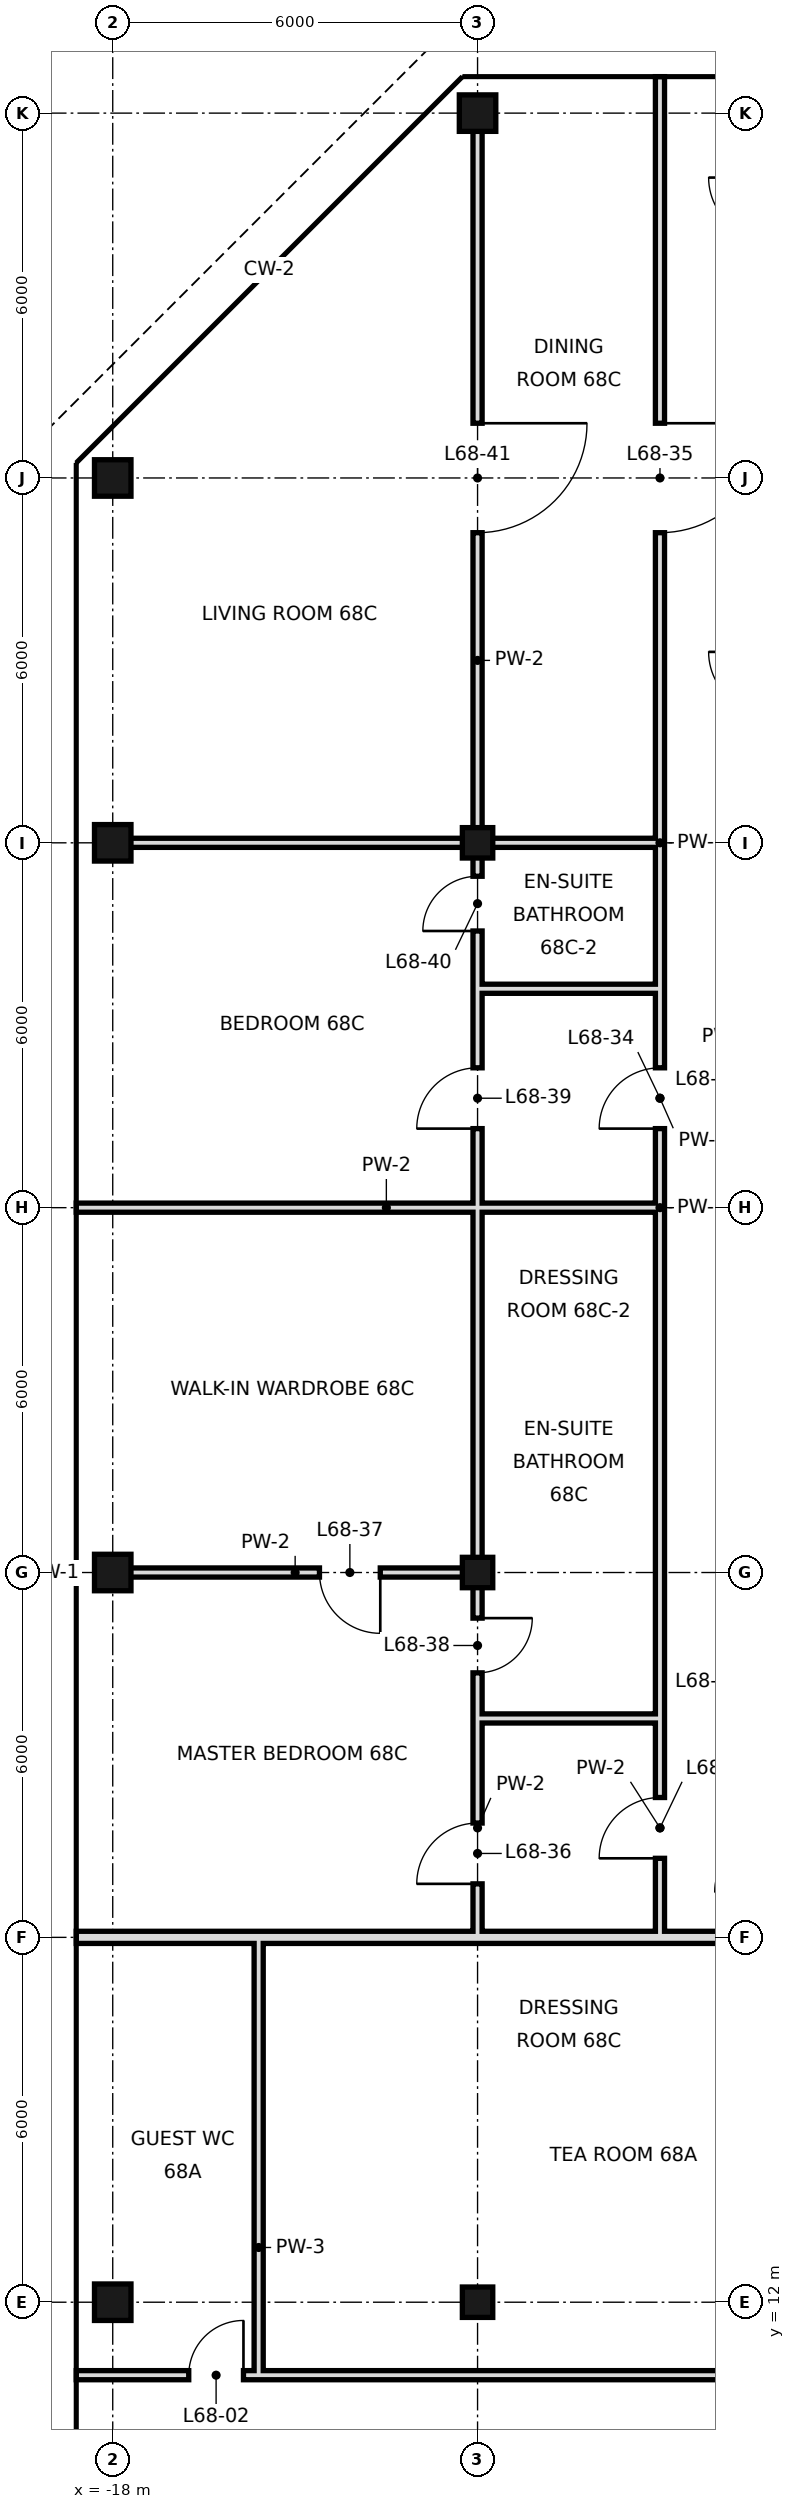
"""IFC4 building model, lengths in metres.
Left out: names, types, materials, properties, quantities, classifications, styles, units other than length and angle.
Written with IfcOpenShell. Run it as: python <this file> out.ifc"""

import sys

from ifc_helpers import new_model, si_unit, direction, frame, frame_2d, origin, origin_2d, place, context, subcontext, project, spatial, rectangle, hollow_rectangle, extrude, element, fill, save


model = new_model("IFC4")
c1 = context("Model", 3, precision=1e-05, world=origin(), true_north=direction((0.0, 1.0)))
c2 = subcontext(c1, "Body", "Model", "MODEL_VIEW")
j1 = project(units=[si_unit("LENGTHUNIT", "METRE"), si_unit("PLANEANGLEUNIT", "RADIAN")], contexts=[c1])
p1 = place(None, origin())
s1 = spatial("IfcSite", under=j1, at=p1, CompositionType="ELEMENT")
p2 = place(p1, origin())
s2 = spatial("IfcBuilding", under=s1, at=p2, CompositionType="ELEMENT")
p3 = place(p2, frame((0.0, 0.0, 290.8)))
s3 = spatial("IfcBuildingStorey", under=s2, at=p3, CompositionType="ELEMENT", Elevation=290.8)
for number, where, z_axis, x_axis in (
    (1, (-18.0, 12.0, -0.3), (0.0, 0.0, 1.0), (1.0, 0.0, 0.0)),
    (2, (-18.0, 24.0, -0.3), (0.0, 0.0, 1.0), (1.0, 0.0, 0.0)),
    (3, (-18.0, 36.0, -0.3), (0.0, 0.0, 1.0), (1.0, 0.0, 0.0)),
    (4, (-18.0, 42.0, -0.3), (0.0, 0.0, 1.0), (1.0, 0.0, 0.0)),
):
    element("IfcColumn", number, at=place(p3, frame(where, z_axis=z_axis, x_axis=x_axis)), inside=s3, PredefinedType="COLUMN", context=c2, shape_type="SweptSolid", body=[
        extrude(hollow_rectangle(XDim=0.6, YDim=0.6, WallThickness=0.028, at=origin_2d()), origin(), (0.0, 0.0, 1.0), 3.9),
    ])
for number, where, z_axis, x_axis in (
    (5, (-12.0, 12.0, 0.0), (0.0, 0.0, 1.0), (1.0, 0.0, 0.0)),
    (6, (-12.0, 24.0, 0.0), (0.0, 0.0, 1.0), (1.0, 0.0, 0.0)),
    (7, (-12.0, 36.0, 0.0), (0.0, 0.0, 1.0), (1.0, 0.0, 0.0)),
):
    element("IfcColumn", number, at=place(p3, frame(where, z_axis=z_axis, x_axis=x_axis)), inside=s3, PredefinedType="COLUMN", context=c2, shape_type="SweptSolid", body=[
        extrude(hollow_rectangle(XDim=0.5, YDim=0.5, WallThickness=0.025, at=origin_2d()), origin(), (0.0, 0.0, 1.0), 3.6),
    ])
p4 = place(p3, frame((-12.0, 48.0, -0.3), z_axis=(0.0, 0.0, 1.0), x_axis=(1.0, 0.0, 0.0)))
e8 = element("IfcColumn", 8, at=p4, inside=s3, PredefinedType="COLUMN", context=c2, shape_type="SweptSolid", body=[
    extrude(hollow_rectangle(XDim=0.6, YDim=0.6, WallThickness=0.028, at=origin_2d()), origin(), (0.0, 0.0, 1.0), 3.9),
])
p5 = place(p3, frame((-12.0, 18.0, 0.0), z_axis=(0.0, 0.0, 1.0), x_axis=(0.0, 1.0, 0.0)))
e9 = element("IfcWall", 9, at=p5, inside=s3, PredefinedType="PARTITIONING", context=c2, shape_type="SweptSolid", body=[
    extrude(rectangle(XDim=3.6, YDim=0.15, at=frame_2d((1.8, 0.0))), origin(), (0.0, 0.0, 1.0), 2.72),
])
p6 = place(p5, frame((0.88, 0.0, 0.0)))
e10 = element("IfcOpeningElement", 10, at=p6, cuts=e9, PredefinedType="OPENING", context=c2, shape_type="SweptSolid", body=[
    extrude(rectangle(XDim=1.0, YDim=2.4, at=frame_2d((0.5, 1.2))), frame((0.0, 0.085, 0.0), z_axis=(0.0, -1.0, 0.0), x_axis=(1.0, 0.0, 0.0)), (0.0, 0.0, 1.0), 0.17),
])
p7 = place(p3, frame((-12.0, 30.0, 0.0), z_axis=(0.0, 0.0, 1.0), x_axis=(0.0, 1.0, 0.0)))
e11 = element("IfcWall", 11, at=p7, inside=s3, PredefinedType="PARTITIONING", context=c2, shape_type="SweptSolid", body=[
    extrude(rectangle(XDim=3.6, YDim=0.15, at=frame_2d((1.8, 0.0))), origin(), (0.0, 0.0, 1.0), 2.72),
])
p8 = place(p7, frame((1.3, 0.0, 0.0)))
e12 = element("IfcOpeningElement", 12, at=p8, cuts=e11, PredefinedType="OPENING", context=c2, shape_type="SweptSolid", body=[
    extrude(rectangle(XDim=1.0, YDim=2.4, at=frame_2d((0.5, 1.2))), frame((0.0, 0.085, 0.0), z_axis=(0.0, -1.0, 0.0), x_axis=(1.0, 0.0, 0.0)), (0.0, 0.0, 1.0), 0.17),
])
p9 = place(p3, frame((-12.0, 36.0, 0.0), z_axis=(0.0, 0.0, 1.0), x_axis=(0.0, 1.0, 0.0)))
e13 = element("IfcWall", 13, at=p9, inside=s3, PredefinedType="PARTITIONING", context=c2, shape_type="SweptSolid", body=[
    extrude(rectangle(XDim=12.0, YDim=0.15, at=frame_2d((6.0, 0.0))), origin(), (0.0, 0.0, 1.0), 2.72),
])
p10 = place(p9, frame((5.1, 0.0, 0.0)))
e14 = element("IfcOpeningElement", 14, at=p10, cuts=e13, PredefinedType="OPENING", context=c2, shape_type="SweptSolid", body=[
    extrude(rectangle(XDim=1.8, YDim=2.4, at=frame_2d((0.9, 1.2))), frame((0.0, 0.085, 0.0), z_axis=(0.0, -1.0, 0.0), x_axis=(1.0, 0.0, 0.0)), (0.0, 0.0, 1.0), 0.17),
])
p11 = place(p3, frame((-12.0, 21.6, 0.0), z_axis=(0.0, 0.0, 1.0), x_axis=(0.0, 1.0, 0.0)))
e15 = element("IfcWall", 15, at=p11, inside=s3, PredefinedType="PARTITIONING", context=c2, shape_type="SweptSolid", body=[
    extrude(rectangle(XDim=8.4, YDim=0.15, at=frame_2d((4.2, 0.0))), origin(), (0.0, 0.0, 1.0), 2.72),
])
p12 = place(p11, frame((0.75, 0.0, 0.0)))
e16 = element("IfcOpeningElement", 16, at=p12, cuts=e15, PredefinedType="OPENING", context=c2, shape_type="SweptSolid", body=[
    extrude(rectangle(XDim=0.9, YDim=2.4, at=frame_2d((0.45, 1.2))), frame((0.0, 0.085, 0.0), z_axis=(0.0, -1.0, 0.0), x_axis=(1.0, 0.0, 0.0)), (0.0, 0.0, 1.0), 0.17),
])
p13 = place(p3, frame((-12.0, 33.6, 0.0), z_axis=(0.0, 0.0, 1.0), x_axis=(0.0, 1.0, 0.0)))
e17 = element("IfcWall", 17, at=p13, inside=s3, PredefinedType="PARTITIONING", context=c2, shape_type="SweptSolid", body=[
    extrude(rectangle(XDim=2.4, YDim=0.15, at=frame_2d((1.2, 0.0))), origin(), (0.0, 0.0, 1.0), 2.72),
])
p14 = place(p13, frame((0.95, 0.0, 0.0)))
e18 = element("IfcOpeningElement", 18, at=p14, cuts=e17, PredefinedType="OPENING", context=c2, shape_type="SweptSolid", body=[
    extrude(rectangle(XDim=0.9, YDim=2.4, at=frame_2d((0.45, 1.2))), frame((0.0, 0.085, 0.0), z_axis=(0.0, -1.0, 0.0), x_axis=(1.0, 0.0, 0.0)), (0.0, 0.0, 1.0), 0.17),
])
p15 = place(p3, frame((-15.6, 10.8, 0.0), z_axis=(0.0, 0.0, 1.0), x_axis=(0.0, 1.0, 0.0)))
e19 = element("IfcWall", 19, at=p15, inside=s3, PredefinedType="PARTITIONING", context=c2, shape_type="SweptSolid", body=[
    extrude(rectangle(XDim=7.2, YDim=0.15, at=frame_2d((3.6, 0.0))), origin(), (0.0, 0.0, 1.0), 3.42),
])
p16 = place(p3, frame((-9.0, 18.0, 0.0), z_axis=(0.0, 0.0, 1.0), x_axis=(0.0, 1.0, 0.0)))
e20 = element("IfcWall", 20, at=p16, inside=s3, PredefinedType="PARTITIONING", context=c2, shape_type="SweptSolid", body=[
    extrude(rectangle(XDim=3.6, YDim=0.15, at=frame_2d((1.8, 0.0))), origin(), (0.0, 0.0, 1.0), 3.42),
])
p17 = place(p16, frame((1.3, 0.0, 0.0)))
e21 = element("IfcOpeningElement", 21, at=p17, cuts=e20, PredefinedType="OPENING", context=c2, shape_type="SweptSolid", body=[
    extrude(rectangle(XDim=1.0, YDim=2.4, at=frame_2d((0.5, 1.2))), frame((0.0, 0.085, 0.0), z_axis=(0.0, -1.0, 0.0), x_axis=(1.0, 0.0, 0.0)), (0.0, 0.0, 1.0), 0.17),
])
p18 = place(p3, frame((-9.0, 30.0, 0.0), z_axis=(0.0, 0.0, 1.0), x_axis=(0.0, 1.0, 0.0)))
e22 = element("IfcWall", 22, at=p18, inside=s3, PredefinedType="PARTITIONING", context=c2, shape_type="SweptSolid", body=[
    extrude(rectangle(XDim=3.6, YDim=0.15, at=frame_2d((1.8, 0.0))), origin(), (0.0, 0.0, 1.0), 3.42),
])
p19 = place(p18, frame((1.3, 0.0, 0.0)))
e23 = element("IfcOpeningElement", 23, at=p19, cuts=e22, PredefinedType="OPENING", context=c2, shape_type="SweptSolid", body=[
    extrude(rectangle(XDim=1.0, YDim=2.4, at=frame_2d((0.5, 1.2))), frame((0.0, 0.085, 0.0), z_axis=(0.0, -1.0, 0.0), x_axis=(1.0, 0.0, 0.0)), (0.0, 0.0, 1.0), 0.17),
])
p20 = place(p3, frame((-9.0, 36.0, 0.0), z_axis=(0.0, 0.0, 1.0), x_axis=(0.0, 1.0, 0.0)))
e24 = element("IfcWall", 24, at=p20, inside=s3, PredefinedType="PARTITIONING", context=c2, shape_type="SweptSolid", body=[
    extrude(rectangle(XDim=12.6, YDim=0.15, at=frame_2d((6.3, 0.0))), origin(), (0.0, 0.0, 1.0), 3.42),
])
p21 = place(p20, frame((5.1, 0.0, 0.0)))
e25 = element("IfcOpeningElement", 25, at=p21, cuts=e24, PredefinedType="OPENING", context=c2, shape_type="SweptSolid", body=[
    extrude(rectangle(XDim=1.8, YDim=2.4, at=frame_2d((0.9, 1.2))), frame((0.0, 0.085, 0.0), z_axis=(0.0, -1.0, 0.0), x_axis=(1.0, 0.0, 0.0)), (0.0, 0.0, 1.0), 0.17),
])
p22 = place(p3, frame((-9.0, 21.6, 0.0), z_axis=(0.0, 0.0, 1.0), x_axis=(0.0, 1.0, 0.0)))
e26 = element("IfcWall", 26, at=p22, inside=s3, PredefinedType="PARTITIONING", context=c2, shape_type="SweptSolid", body=[
    extrude(rectangle(XDim=8.4, YDim=0.15, at=frame_2d((4.2, 0.0))), origin(), (0.0, 0.0, 1.0), 3.42),
])
p23 = place(p3, frame((-9.0, 33.6, 0.0), z_axis=(0.0, 0.0, 1.0), x_axis=(0.0, 1.0, 0.0)))
e27 = element("IfcWall", 27, at=p23, inside=s3, PredefinedType="PARTITIONING", context=c2, shape_type="SweptSolid", body=[
    extrude(rectangle(XDim=2.4, YDim=0.15, at=frame_2d((1.2, 0.0))), origin(), (0.0, 0.0, 1.0), 3.42),
])
p24 = place(p3, frame((-15.6, 10.8, 0.0), z_axis=(0.0, 0.0, 1.0), x_axis=(1.0, 0.0, 0.0)))
e28 = element("IfcWall", 28, at=p24, inside=s3, PredefinedType="PARTITIONING", context=c2, shape_type="SweptSolid", body=[
    extrude(rectangle(XDim=23.4, YDim=0.15, at=frame_2d((11.7, 0.0))), origin(), (0.0, 0.0, 1.0), 3.42),
])
p25 = place(p24, frame((10.75, 0.0, 0.0)))
e29 = element("IfcOpeningElement", 29, at=p25, cuts=e28, PredefinedType="OPENING", context=c2, shape_type="SweptSolid", body=[
    extrude(rectangle(XDim=1.0, YDim=2.4, at=frame_2d((0.5, 1.2))), frame((0.0, 0.085, 0.0), z_axis=(0.0, -1.0, 0.0), x_axis=(1.0, 0.0, 0.0)), (0.0, 0.0, 1.0), 0.17),
])
p26 = place(p24, frame((17.2, 0.0, 0.0)))
e30 = element("IfcOpeningElement", 30, at=p26, cuts=e28, PredefinedType="OPENING", context=c2, shape_type="SweptSolid", body=[
    extrude(rectangle(XDim=1.0, YDim=2.4, at=frame_2d((0.5, 1.2))), frame((0.0, 0.085, 0.0), z_axis=(0.0, -1.0, 0.0), x_axis=(1.0, 0.0, 0.0)), (0.0, 0.0, 1.0), 0.17),
])
p27 = place(p3, frame((-18.6, 10.8, 0.0), z_axis=(0.0, 0.0, 1.0), x_axis=(1.0, 0.0, 0.0)))
e31 = element("IfcWall", 31, at=p27, inside=s3, PredefinedType="PARTITIONING", context=c2, shape_type="SweptSolid", body=[
    extrude(rectangle(XDim=3.0, YDim=0.15, at=frame_2d((1.5, 0.0))), origin(), (0.0, 0.0, 1.0), 3.42),
])
p28 = place(p27, frame((1.85, 0.0, 0.0)))
e32 = element("IfcOpeningElement", 32, at=p28, cuts=e31, PredefinedType="OPENING", context=c2, shape_type="SweptSolid", body=[
    extrude(rectangle(XDim=0.9, YDim=2.4, at=frame_2d((0.45, 1.2))), frame((0.0, 0.085, 0.0), z_axis=(0.0, -1.0, 0.0), x_axis=(1.0, 0.0, 0.0)), (0.0, 0.0, 1.0), 0.17),
])
p29 = place(p3, frame((-18.6, 18.0, 0.0), z_axis=(0.0, 0.0, 1.0), x_axis=(1.0, 0.0, 0.0)))
e33 = element("IfcWall", 33, at=p29, inside=s3, PredefinedType="SOLIDWALL", context=c2, shape_type="SweptSolid", body=[
    extrude(rectangle(XDim=21.7, YDim=0.2, at=frame_2d((10.85, 0.0))), origin(), (0.0, 0.0, 1.0), 2.72),
])
p30 = place(p3, frame((-12.0, 21.6, 0.0), z_axis=(0.0, 0.0, 1.0), x_axis=(1.0, 0.0, 0.0)))
e34 = element("IfcWall", 34, at=p30, inside=s3, PredefinedType="PARTITIONING", context=c2, shape_type="SweptSolid", body=[
    extrude(rectangle(XDim=3.0, YDim=0.15, at=frame_2d((1.5, 0.0))), origin(), (0.0, 0.0, 1.0), 3.42),
])
p31 = place(p3, frame((-18.0, 24.0, 0.0), z_axis=(0.0, 0.0, 1.0), x_axis=(1.0, 0.0, 0.0)))
e35 = element("IfcWall", 35, at=p31, inside=s3, PredefinedType="PARTITIONING", context=c2, shape_type="SweptSolid", body=[
    extrude(rectangle(XDim=6.0, YDim=0.15, at=frame_2d((3.0, 0.0))), origin(), (0.0, 0.0, 1.0), 2.97),
])
p32 = place(p31, frame((3.4, 0.0, 0.0)))
e36 = element("IfcOpeningElement", 36, at=p32, cuts=e35, PredefinedType="OPENING", context=c2, shape_type="SweptSolid", body=[
    extrude(rectangle(XDim=1.0, YDim=2.4, at=frame_2d((0.5, 1.2))), frame((0.0, 0.085, 0.0), z_axis=(0.0, -1.0, 0.0), x_axis=(1.0, 0.0, 0.0)), (0.0, 0.0, 1.0), 0.17),
])
p33 = place(p3, frame((-18.6, 30.0, 0.0), z_axis=(0.0, 0.0, 1.0), x_axis=(1.0, 0.0, 0.0)))
e37 = element("IfcWall", 37, at=p33, inside=s3, PredefinedType="PARTITIONING", context=c2, shape_type="SweptSolid", body=[
    extrude(rectangle(XDim=6.6, YDim=0.15, at=frame_2d((3.3, 0.0))), origin(), (0.0, 0.0, 1.0), 2.97),
])
p34 = place(p3, frame((-12.0, 30.0, 0.0), z_axis=(0.0, 0.0, 1.0), x_axis=(1.0, 0.0, 0.0)))
e38 = element("IfcWall", 38, at=p34, inside=s3, PredefinedType="PARTITIONING", context=c2, shape_type="SweptSolid", body=[
    extrude(rectangle(XDim=3.0, YDim=0.15, at=frame_2d((1.5, 0.0))), origin(), (0.0, 0.0, 1.0), 2.72),
])
p35 = place(p3, frame((-12.0, 33.6, 0.0), z_axis=(0.0, 0.0, 1.0), x_axis=(1.0, 0.0, 0.0)))
e39 = element("IfcWall", 39, at=p35, inside=s3, PredefinedType="PARTITIONING", context=c2, shape_type="SweptSolid", body=[
    extrude(rectangle(XDim=3.0, YDim=0.15, at=frame_2d((1.5, 0.0))), origin(), (0.0, 0.0, 1.0), 3.42),
])
p36 = place(p3, frame((-18.0, 36.0, 0.0), z_axis=(0.0, 0.0, 1.0), x_axis=(1.0, 0.0, 0.0)))
e40 = element("IfcWall", 40, at=p36, inside=s3, PredefinedType="PARTITIONING", context=c2, shape_type="SweptSolid", body=[
    extrude(rectangle(XDim=6.0, YDim=0.15, at=frame_2d((3.0, 0.0))), origin(), (0.0, 0.0, 1.0), 2.97),
])
p37 = place(p3, frame((-12.0, 36.0, 0.0), z_axis=(0.0, 0.0, 1.0), x_axis=(1.0, 0.0, 0.0)))
e41 = element("IfcWall", 41, at=p37, inside=s3, PredefinedType="PARTITIONING", context=c2, shape_type="SweptSolid", body=[
    extrude(rectangle(XDim=3.0, YDim=0.15, at=frame_2d((1.5, 0.0))), origin(), (0.0, 0.0, 1.0), 2.72),
])
p38 = place(p28, frame((0.9, 0.0, 0.0), z_axis=(0.0, 0.0, 1.0), x_axis=(-1.0, 0.0, 0.0)))
e42 = element("IfcDoor", 42, at=p38, inside=s3, OperationType="SINGLE_SWING_LEFT", PredefinedType="DOOR", context=c2, shape_type="SweptSolid", body=[
    extrude(rectangle(XDim=0.9, YDim=2.4, at=frame_2d((0.45, 1.2))), frame((0.0, 0.025, 0.0), z_axis=(0.0, -1.0, 0.0), x_axis=(1.0, 0.0, 0.0)), (0.0, 0.0, 1.0), 0.05),
])
fill(e32, e42)
p39 = place(p17, origin())
e43 = element("IfcDoor", 43, at=p39, inside=s3, OperationType="SINGLE_SWING_LEFT", PredefinedType="DOOR", context=c2, shape_type="SweptSolid", body=[
    extrude(rectangle(XDim=1.0, YDim=2.4, at=frame_2d((0.5, 1.2))), frame((0.0, 0.025, 0.0), z_axis=(0.0, -1.0, 0.0), x_axis=(1.0, 0.0, 0.0)), (0.0, 0.0, 1.0), 0.05),
])
fill(e21, e43)
p40 = place(p19, origin())
e44 = element("IfcDoor", 44, at=p40, inside=s3, OperationType="SINGLE_SWING_LEFT", PredefinedType="DOOR", context=c2, shape_type="SweptSolid", body=[
    extrude(rectangle(XDim=1.0, YDim=2.4, at=frame_2d((0.5, 1.2))), frame((0.0, 0.025, 0.0), z_axis=(0.0, -1.0, 0.0), x_axis=(1.0, 0.0, 0.0)), (0.0, 0.0, 1.0), 0.05),
])
fill(e23, e44)
p41 = place(p21, origin())
e45 = element("IfcDoor", 45, at=p41, inside=s3, OperationType="SINGLE_SWING_RIGHT", PredefinedType="DOOR", context=c2, shape_type="SweptSolid", body=[
    extrude(rectangle(XDim=1.8, YDim=2.4, at=frame_2d((0.9, 1.2))), frame((0.0, 0.025, 0.0), z_axis=(0.0, -1.0, 0.0), x_axis=(1.0, 0.0, 0.0)), (0.0, 0.0, 1.0), 0.05),
])
fill(e25, e45)
p42 = place(p6, origin())
e46 = element("IfcDoor", 46, at=p42, inside=s3, OperationType="SINGLE_SWING_LEFT", PredefinedType="DOOR", context=c2, shape_type="SweptSolid", body=[
    extrude(rectangle(XDim=1.0, YDim=2.4, at=frame_2d((0.5, 1.2))), frame((0.0, 0.025, 0.0), z_axis=(0.0, -1.0, 0.0), x_axis=(1.0, 0.0, 0.0)), (0.0, 0.0, 1.0), 0.05),
])
fill(e10, e46)
p43 = place(p32, origin())
e47 = element("IfcDoor", 47, at=p43, inside=s3, OperationType="SINGLE_SWING_RIGHT", PredefinedType="DOOR", context=c2, shape_type="SweptSolid", body=[
    extrude(rectangle(XDim=1.0, YDim=2.4, at=frame_2d((0.5, 1.2))), frame((0.0, 0.025, 0.0), z_axis=(0.0, -1.0, 0.0), x_axis=(1.0, 0.0, 0.0)), (0.0, 0.0, 1.0), 0.05),
])
fill(e36, e47)
p44 = place(p12, origin())
e48 = element("IfcDoor", 48, at=p44, inside=s3, OperationType="SINGLE_SWING_RIGHT", PredefinedType="DOOR", context=c2, shape_type="SweptSolid", body=[
    extrude(rectangle(XDim=0.9, YDim=2.4, at=frame_2d((0.45, 1.2))), frame((0.0, 0.025, 0.0), z_axis=(0.0, -1.0, 0.0), x_axis=(1.0, 0.0, 0.0)), (0.0, 0.0, 1.0), 0.05),
])
fill(e16, e48)
p45 = place(p8, origin())
e49 = element("IfcDoor", 49, at=p45, inside=s3, OperationType="SINGLE_SWING_LEFT", PredefinedType="DOOR", context=c2, shape_type="SweptSolid", body=[
    extrude(rectangle(XDim=1.0, YDim=2.4, at=frame_2d((0.5, 1.2))), frame((0.0, 0.025, 0.0), z_axis=(0.0, -1.0, 0.0), x_axis=(1.0, 0.0, 0.0)), (0.0, 0.0, 1.0), 0.05),
])
fill(e12, e49)
p46 = place(p14, origin())
e50 = element("IfcDoor", 50, at=p46, inside=s3, OperationType="SINGLE_SWING_LEFT", PredefinedType="DOOR", context=c2, shape_type="SweptSolid", body=[
    extrude(rectangle(XDim=0.9, YDim=2.4, at=frame_2d((0.45, 1.2))), frame((0.0, 0.025, 0.0), z_axis=(0.0, -1.0, 0.0), x_axis=(1.0, 0.0, 0.0)), (0.0, 0.0, 1.0), 0.05),
])
fill(e18, e50)
p47 = place(p10, origin())
e51 = element("IfcDoor", 51, at=p47, inside=s3, OperationType="SINGLE_SWING_RIGHT", PredefinedType="DOOR", context=c2, shape_type="SweptSolid", body=[
    extrude(rectangle(XDim=1.8, YDim=2.4, at=frame_2d((0.9, 1.2))), frame((0.0, 0.025, 0.0), z_axis=(0.0, -1.0, 0.0), x_axis=(1.0, 0.0, 0.0)), (0.0, 0.0, 1.0), 0.05),
])
fill(e14, e51)
save(model, sys.argv[1])
